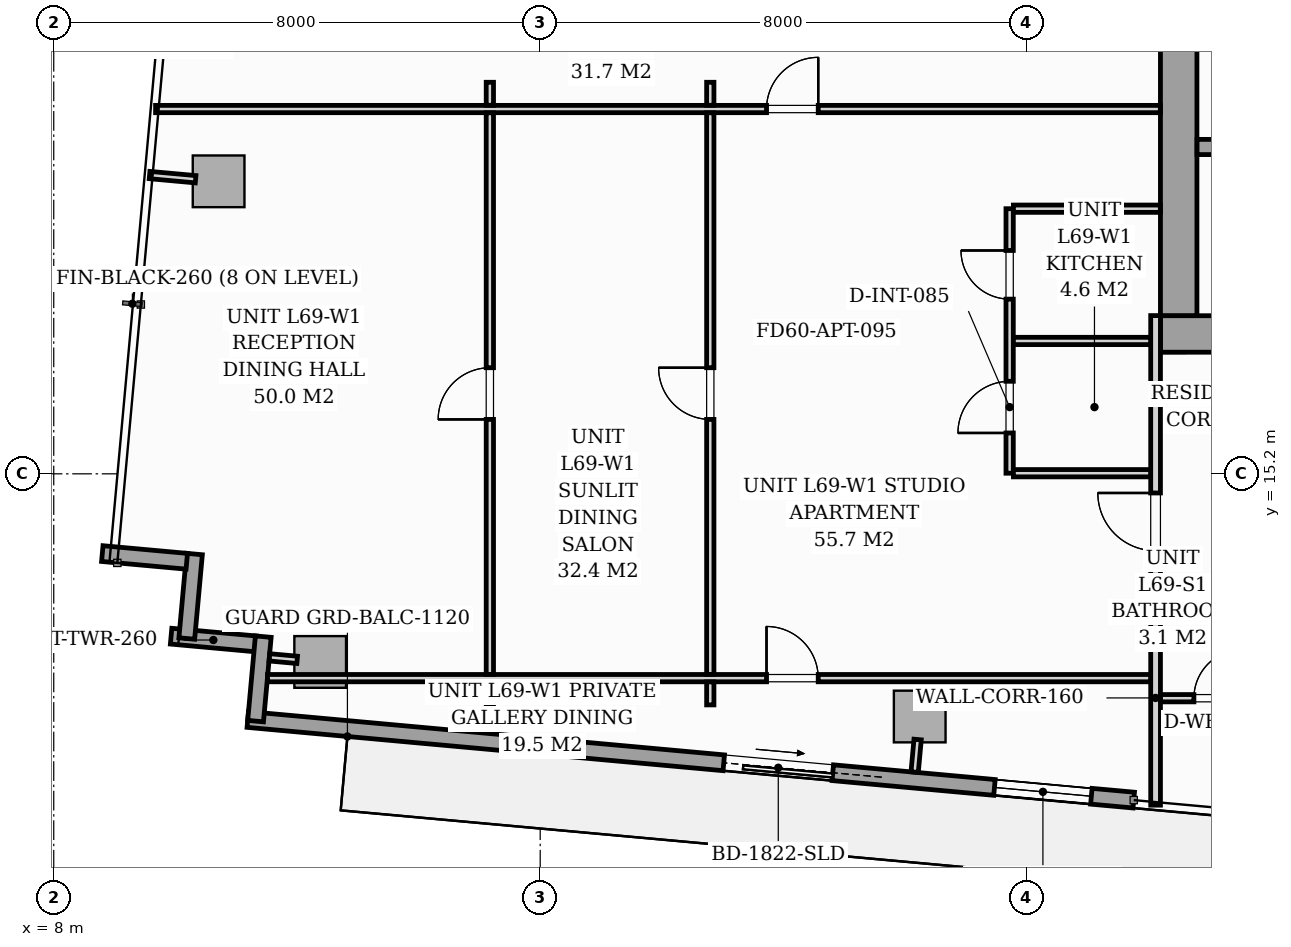
"""IFC4 building model, lengths in metres.
Left out: names, types, materials, properties, quantities, classifications, styles, units other than length and angle.
Written with IfcOpenShell. Run it as: python <this file> out.ifc"""

import sys

from ifc_helpers import new_model, si_unit, direction, frame, frame_2d, origin, origin_2d, place, context, subcontext, project, spatial, rectangle, i_section, extrude, source, transform, mapped, element, fill, save


model = new_model("IFC4")
c1 = context("Model", 3, precision=1e-05, world=origin(), true_north=direction((0.0, 1.0)))
c2 = subcontext(c1, "Body", "Model", "MODEL_VIEW")
j1 = project(units=[si_unit("LENGTHUNIT", "METRE"), si_unit("PLANEANGLEUNIT", "RADIAN")], contexts=[c1])
p1 = place(None, origin())
s1 = spatial("IfcSite", under=j1, at=p1, CompositionType="ELEMENT")
p2 = place(p1, origin())
s2 = spatial("IfcBuilding", under=s1, at=p2, CompositionType="ELEMENT")
p3 = place(p2, frame((0.0, 0.0, 239.7)))
s3 = spatial("IfcBuildingStorey", under=s2, at=p3, CompositionType="ELEMENT", Elevation=239.7)
m1 = source(origin(), c2, "Body", "SweptSolid", [
    extrude(i_section(OverallWidth=0.409, OverallDepth=0.425, WebThickness=0.033, FlangeThickness=0.052, FilletRadius=0.018, at=origin_2d()), origin(), (0.0, 0.0, 1.0), 3.296),
])
p4 = place(p3, frame((26.4, 17.4, 0.002), z_axis=(0.0, 0.0, 1.0), x_axis=(1.0, 0.0, 0.0)))
e1 = element("IfcColumn", 1, at=p4, inside=s3, PredefinedType="PILASTER", context=c2, shape_type="MappedRepresentation", body=[
    mapped(m1, transform((0.0, 0.0, 0.0), scale=1.0)),
])
m2 = source(origin(), c2, "Body", "SweptSolid", [
    extrude(rectangle(XDim=0.85, YDim=0.85, at=origin_2d()), origin(), (0.0, 0.0, 1.0), 3.296),
])
for number, where, z_axis, x_axis in (
    (2, (12.382, 12.106, 0.002), (0.0, 0.0, 1.0), (0.996, -0.091, 0.0)),
    (3, (22.241, 11.209, 0.002), (0.0, 0.0, 1.0), (0.996, -0.091, 0.0)),
    (4, (10.711, 20.01, 0.002), (0.0, 0.0, 1.0), (0.996, -0.091, 0.0)),
):
    element("IfcColumn", number, at=place(p3, frame(where, z_axis=z_axis, x_axis=x_axis)), inside=s3, PredefinedType="COLUMN", context=c2, shape_type="MappedRepresentation", body=[
        mapped(m2, transform((0.0, 0.0, 0.0), scale=1.0)),
    ])
p5 = place(p3, frame((11.319, 12.404, 0.0), z_axis=(0.0, 0.0, 1.0), x_axis=(-0.995881721538, 0.090661991521, 0.0)))
e5 = element("IfcWall", 5, at=p5, inside=s3, PredefinedType="STANDARD", context=c2, shape_type="SweptSolid", body=[
    extrude(rectangle(XDim=1.395, YDim=0.26, at=frame_2d((0.698, 0.0))), origin(), (0.0, 0.0, 1.0), 3.04),
])
p6 = place(p3, frame((10.188, 12.492, 0.0), z_axis=(0.0, 0.0, 1.0), x_axis=(0.090646191665, 0.995883159782, 0.0)))
e6 = element("IfcWall", 6, at=p6, inside=s3, PredefinedType="STANDARD", context=c2, shape_type="SweptSolid", body=[
    extrude(rectangle(XDim=1.395, YDim=0.26, at=frame_2d((0.698, 0.0))), origin(), (0.0, 0.0, 1.0), 3.04),
])
p7 = place(p3, frame((10.188, 13.762, 0.0), z_axis=(0.0, 0.0, 1.0), x_axis=(-0.995881721538, 0.090661991521, 0.0)))
e7 = element("IfcWall", 7, at=p7, inside=s3, PredefinedType="STANDARD", context=c2, shape_type="SweptSolid", body=[
    extrude(rectangle(XDim=1.395, YDim=0.26, at=frame_2d((0.698, 0.0))), origin(), (0.0, 0.0, 1.0), 3.04),
])
p8 = place(p3, frame((25.761, 9.834, 0.0), z_axis=(0.0, 0.0, 1.0), x_axis=(-0.995884584572, 0.090630536861, 0.0)))
e8 = element("IfcWall", 8, at=p8, inside=s3, PredefinedType="STANDARD", context=c2, shape_type="SweptSolid", body=[
    extrude(rectangle(XDim=14.63, YDim=0.26, at=frame_2d((7.315, 0.0))), origin(), (0.0, 0.0, 1.0), 3.04),
])
p9 = place(p8, frame((4.97, 0.0, 0.0)))
e9 = element("IfcOpeningElement", 9, at=p9, cuts=e8, PredefinedType="OPENING", context=c2, shape_type="SweptSolid", body=[
    extrude(rectangle(XDim=1.8, YDim=2.06, at=frame_2d((0.9, 1.03))), frame((0.0, 0.14, 0.0), z_axis=(0.0, -1.0, 0.0), x_axis=(1.0, 0.0, 0.0)), (0.0, 0.0, 1.0), 0.28),
])
p10 = place(p8, frame((0.7, 0.0, 0.65)))
e10 = element("IfcOpeningElement", 10, at=p10, cuts=e8, PredefinedType="OPENING", context=c2, shape_type="SweptSolid", body=[
    extrude(rectangle(XDim=1.6, YDim=1.5, at=frame_2d((0.8, 0.75))), frame((0.0, 0.14, 0.0), z_axis=(0.0, -1.0, 0.0), x_axis=(1.0, 0.0, 0.0)), (0.0, 0.0, 1.0), 0.28),
])
p11 = place(p3, frame((11.319, 11.134, 0.0), z_axis=(0.0, 0.0, 1.0), x_axis=(0.090661991521, 0.995881721538, 0.0)))
e11 = element("IfcWall", 11, at=p11, inside=s3, PredefinedType="STANDARD", context=c2, shape_type="SweptSolid", body=[
    extrude(rectangle(XDim=1.395, YDim=0.26, at=frame_2d((0.698, 0.0))), origin(), (0.0, 0.0, 1.0), 3.04),
])
p12 = place(p3, frame((26.2, 17.5, 0.0), z_axis=(0.0, 0.0, 1.0), x_axis=(1.0, 0.0, 0.0)))
e12 = element("IfcWall", 12, at=p12, inside=s3, PredefinedType="SHEAR", context=c2, shape_type="SweptSolid", body=[
    extrude(rectangle(XDim=19.6, YDim=0.6, at=frame_2d((9.8, 0.0))), origin(), (0.0, 0.0, 1.0), 3.3),
])
p13 = place(p12, frame((0.95, 0.0, 0.0)))
e13 = element("IfcOpeningElement", 13, at=p13, cuts=e12, PredefinedType="OPENING", context=c2, shape_type="SweptSolid", body=[
    extrude(rectangle(XDim=0.95, YDim=2.06, at=frame_2d((0.475, 1.03))), frame((0.0, 0.31, 0.0), z_axis=(0.0, -1.0, 0.0), x_axis=(1.0, 0.0, 0.0)), (0.0, 0.0, 1.0), 0.62),
])
p14 = place(p12, frame((9.38, 0.0, 0.0)))
e14 = element("IfcOpeningElement", 14, at=p14, cuts=e12, PredefinedType="OPENING", context=c2, shape_type="SweptSolid", body=[
    extrude(rectangle(XDim=0.85, YDim=2.0, at=frame_2d((0.425, 1.0))), frame((0.0, 0.31, 0.0), z_axis=(0.0, -1.0, 0.0), x_axis=(1.0, 0.0, 0.0)), (0.0, 0.0, 1.0), 0.62),
])
p15 = place(p12, frame((17.55, 0.0, 0.0)))
e15 = element("IfcOpeningElement", 15, at=p15, cuts=e12, PredefinedType="OPENING", context=c2, shape_type="SweptSolid", body=[
    extrude(rectangle(XDim=0.95, YDim=2.06, at=frame_2d((0.475, 1.03))), frame((0.0, 0.31, 0.0), z_axis=(0.0, -1.0, 0.0), x_axis=(1.0, 0.0, 0.0)), (0.0, 0.0, 1.0), 0.62),
])
p16 = place(p3, frame((26.5, 17.802, 0.0), z_axis=(0.0, 0.0, 1.0), x_axis=(0.0, 1.0, 0.0)))
e16 = element("IfcWall", 16, at=p16, inside=s3, PredefinedType="SHEAR", context=c2, shape_type="SweptSolid", body=[
    extrude(rectangle(XDim=5.796, YDim=0.6, at=frame_2d((2.898, 0.0))), origin(), (0.0, 0.0, 1.0), 3.3),
])
p17 = place(p3, frame((26.802, 20.575, 0.0), z_axis=(0.0, 0.0, 1.0), x_axis=(1.0, 0.0, 0.0)))
e17 = element("IfcWall", 17, at=p17, inside=s3, PredefinedType="SOLIDWALL", context=c2, shape_type="SweptSolid", body=[
    extrude(rectangle(XDim=8.148, YDim=0.25, at=frame_2d((4.074, 0.0))), origin(), (0.0, 0.0, 1.0), 3.3),
])
p18 = place(p17, frame((0.298, 0.0, 0.0)))
e18 = element("IfcOpeningElement", 18, at=p18, cuts=e17, PredefinedType="OPENING", context=c2, shape_type="SweptSolid", body=[
    extrude(rectangle(XDim=0.95, YDim=2.06, at=frame_2d((0.475, 1.03))), frame((0.0, 0.135, 0.0), z_axis=(0.0, -1.0, 0.0), x_axis=(1.0, 0.0, 0.0)), (0.0, 0.0, 1.0), 0.27),
])
p19 = place(p3, frame((26.12, 13.36, 0.0), z_axis=(0.0, 0.0, 1.0), x_axis=(1.0, 0.0, 0.0)))
e19 = element("IfcWall", 19, at=p19, inside=s3, PredefinedType="PARTITIONING", context=c2, shape_type="SweptSolid", body=[
    extrude(rectangle(XDim=19.76, YDim=0.16, at=frame_2d((9.88, 0.0))), origin(), (0.0, 0.0, 1.0), 2.605),
])
p20 = place(p19, frame((5.221, 0.0, 0.0)))
e20 = element("IfcOpeningElement", 20, at=p20, cuts=e19, PredefinedType="OPENING", context=c2, shape_type="SweptSolid", body=[
    extrude(rectangle(XDim=0.95, YDim=2.06, at=frame_2d((0.475, 1.03))), frame((0.0, 0.09, 0.0), z_axis=(0.0, -1.0, 0.0), x_axis=(1.0, 0.0, 0.0)), (0.0, 0.0, 1.0), 0.18),
])
p21 = place(p19, frame((8.074, 0.0, 0.0)))
e21 = element("IfcOpeningElement", 21, at=p21, cuts=e19, PredefinedType="OPENING", context=c2, shape_type="SweptSolid", body=[
    extrude(rectangle(XDim=0.95, YDim=2.06, at=frame_2d((0.475, 1.03))), frame((0.0, 0.09, 0.0), z_axis=(0.0, -1.0, 0.0), x_axis=(1.0, 0.0, 0.0)), (0.0, 0.0, 1.0), 0.18),
])
p22 = place(p19, frame((18.17, 0.0, 0.0)))
e22 = element("IfcOpeningElement", 22, at=p22, cuts=e19, PredefinedType="OPENING", context=c2, shape_type="SweptSolid", body=[
    extrude(rectangle(XDim=0.95, YDim=2.06, at=frame_2d((0.475, 1.03))), frame((0.0, 0.09, 0.0), z_axis=(0.0, -1.0, 0.0), x_axis=(1.0, 0.0, 0.0)), (0.0, 0.0, 1.0), 0.18),
])
p23 = place(p3, frame((26.12, 9.751, 0.0), z_axis=(0.0, 0.0, 1.0), x_axis=(0.0, 1.0, 0.0)))
e23 = element("IfcWall", 23, at=p23, inside=s3, PredefinedType="PARTITIONING", context=c2, shape_type="SweptSolid", body=[
    extrude(rectangle(XDim=3.527, YDim=0.16, at=frame_2d((1.763, 0.0))), origin(), (0.0, 0.0, 1.0), 3.04),
])
p24 = place(p3, frame((26.12, 13.442, 0.0), z_axis=(0.0, 0.0, 1.0), x_axis=(0.0, 1.0, 0.0)))
e24 = element("IfcWall", 24, at=p24, inside=s3, PredefinedType="PARTITIONING", context=c2, shape_type="SweptSolid", body=[
    extrude(rectangle(XDim=4.36, YDim=0.16, at=frame_2d((2.18, 0.0))), origin(), (0.0, 0.0, 1.0), 3.04),
])
p25 = place(p24, frame((0.493, 0.0, 0.0)))
e25 = element("IfcOpeningElement", 25, at=p25, cuts=e24, PredefinedType="OPENING", context=c2, shape_type="SweptSolid", body=[
    extrude(rectangle(XDim=0.95, YDim=2.06, at=frame_2d((0.475, 1.03))), frame((0.0, 0.09, 0.0), z_axis=(0.0, -1.0, 0.0), x_axis=(1.0, 0.0, 0.0)), (0.0, 0.0, 1.0), 0.18),
])
p26 = place(p3, frame((26.202, 11.51, 0.0), z_axis=(0.0, 0.0, 1.0), x_axis=(1.0, 0.0, 0.0)))
e26 = element("IfcWall", 26, at=p26, inside=s3, PredefinedType="PARTITIONING", context=c2, shape_type="SweptSolid", body=[
    extrude(rectangle(XDim=4.098, YDim=0.12, at=frame_2d((2.049, 0.0))), origin(), (0.0, 0.0, 1.0), 2.605),
])
p27 = place(p26, frame((0.548, 0.0, 0.0)))
e27 = element("IfcOpeningElement", 27, at=p27, cuts=e26, PredefinedType="OPENING", context=c2, shape_type="SweptSolid", body=[
    extrude(rectangle(XDim=0.8, YDim=2.02, at=frame_2d((0.4, 1.01))), frame((0.0, 0.07, 0.0), z_axis=(0.0, -1.0, 0.0), x_axis=(1.0, 0.0, 0.0)), (0.0, 0.0, 1.0), 0.14),
])
p28 = place(p26, frame((2.573, 0.0, 0.0)))
e28 = element("IfcOpeningElement", 28, at=p28, cuts=e26, PredefinedType="OPENING", context=c2, shape_type="SweptSolid", body=[
    extrude(rectangle(XDim=0.85, YDim=2.05, at=frame_2d((0.425, 1.025))), frame((0.0, 0.07, 0.0), z_axis=(0.0, -1.0, 0.0), x_axis=(1.0, 0.0, 0.0)), (0.0, 0.0, 1.0), 0.14),
])
p29 = place(p3, frame((23.72, 15.21, 0.0), z_axis=(0.0, 0.0, 1.0), x_axis=(0.0, 1.0, 0.0)))
e29 = element("IfcWall", 29, at=p29, inside=s3, PredefinedType="PARTITIONING", context=c2, shape_type="SweptSolid", body=[
    extrude(rectangle(XDim=4.35, YDim=0.12, at=frame_2d((2.175, 0.0))), origin(), (0.0, 0.0, 1.0), 3.04),
])
p30 = place(p29, frame((0.662, 0.0, 0.0)))
e30 = element("IfcOpeningElement", 30, at=p30, cuts=e29, PredefinedType="OPENING", context=c2, shape_type="SweptSolid", body=[
    extrude(rectangle(XDim=0.85, YDim=2.05, at=frame_2d((0.425, 1.025))), frame((0.0, 0.07, 0.0), z_axis=(0.0, -1.0, 0.0), x_axis=(1.0, 0.0, 0.0)), (0.0, 0.0, 1.0), 0.14),
])
p31 = place(p29, frame((2.863, 0.0, 0.0)))
e31 = element("IfcOpeningElement", 31, at=p31, cuts=e29, PredefinedType="OPENING", context=c2, shape_type="SweptSolid", body=[
    extrude(rectangle(XDim=0.8, YDim=2.02, at=frame_2d((0.4, 1.01))), frame((0.0, 0.07, 0.0), z_axis=(0.0, -1.0, 0.0), x_axis=(1.0, 0.0, 0.0)), (0.0, 0.0, 1.0), 0.14),
])
p32 = place(p3, frame((23.782, 17.385, 0.0), z_axis=(0.0, 0.0, 1.0), x_axis=(1.0, 0.0, 0.0)))
e32 = element("IfcWall", 32, at=p32, inside=s3, PredefinedType="PARTITIONING", context=c2, shape_type="SweptSolid", body=[
    extrude(rectangle(XDim=2.256, YDim=0.12, at=frame_2d((1.128, 0.0))), origin(), (0.0, 0.0, 1.0), 2.381),
])
p33 = place(p3, frame((23.782, 15.21, 0.0), z_axis=(0.0, 0.0, 1.0), x_axis=(1.0, 0.0, 0.0)))
e33 = element("IfcWall", 33, at=p33, inside=s3, PredefinedType="PARTITIONING", context=c2, shape_type="SweptSolid", body=[
    extrude(rectangle(XDim=2.256, YDim=0.12, at=frame_2d((1.128, 0.0))), origin(), (0.0, 0.0, 1.0), 3.04),
])
p34 = place(p3, frame((23.782, 19.56, 0.0), z_axis=(0.0, 0.0, 1.0), x_axis=(1.0, 0.0, 0.0)))
e34 = element("IfcWall", 34, at=p34, inside=s3, PredefinedType="PARTITIONING", context=c2, shape_type="SweptSolid", body=[
    extrude(rectangle(XDim=2.416, YDim=0.12, at=frame_2d((1.208, 0.0))), origin(), (0.0, 0.0, 1.0), 3.04),
])
p35 = place(p3, frame((11.516, 11.84, 0.0), z_axis=(0.0, 0.0, 1.0), x_axis=(1.0, 0.0, 0.0)))
e35 = element("IfcWall", 35, at=p35, inside=s3, PredefinedType="PARTITIONING", context=c2, shape_type="SweptSolid", body=[
    extrude(rectangle(XDim=14.522, YDim=0.12, at=frame_2d((7.261, 0.0))), origin(), (0.0, 0.0, 1.0), 2.483),
])
p36 = place(p35, frame((8.206, 0.0, 0.0)))
e36 = element("IfcOpeningElement", 36, at=p36, cuts=e35, PredefinedType="OPENING", context=c2, shape_type="SweptSolid", body=[
    extrude(rectangle(XDim=0.85, YDim=2.05, at=frame_2d((0.425, 1.025))), frame((0.0, 0.07, 0.0), z_axis=(0.0, -1.0, 0.0), x_axis=(1.0, 0.0, 0.0)), (0.0, 0.0, 1.0), 0.14),
])
p37 = place(p3, frame((9.675, 21.199, 0.0), z_axis=(0.0, 0.0, 1.0), x_axis=(1.0, 0.0, 0.0)))
e37 = element("IfcWall", 37, at=p37, inside=s3, PredefinedType="PARTITIONING", context=c2, shape_type="SweptSolid", body=[
    extrude(rectangle(XDim=16.523, YDim=0.12, at=frame_2d((8.262, 0.0))), origin(), (0.0, 0.0, 1.0), 3.04),
])
p38 = place(p37, frame((10.047, 0.0, 0.0)))
e38 = element("IfcOpeningElement", 38, at=p38, cuts=e37, PredefinedType="OPENING", context=c2, shape_type="SweptSolid", body=[
    extrude(rectangle(XDim=0.85, YDim=2.05, at=frame_2d((0.425, 1.025))), frame((0.0, 0.07, 0.0), z_axis=(0.0, -1.0, 0.0), x_axis=(1.0, 0.0, 0.0)), (0.0, 0.0, 1.0), 0.14),
])
p39 = place(p3, frame((15.172, 11.4, 0.0), z_axis=(0.0, 0.0, 1.0), x_axis=(0.0, 1.0, 0.0)))
e39 = element("IfcWall", 39, at=p39, inside=s3, PredefinedType="PARTITIONING", context=c2, shape_type="SweptSolid", body=[
    extrude(rectangle(XDim=0.378, YDim=0.12, at=frame_2d((0.189, 0.0))), origin(), (0.0, 0.0, 1.0), 3.04),
])
p40 = place(p3, frame((15.172, 11.902, 0.0), z_axis=(0.0, 0.0, 1.0), x_axis=(0.0, 1.0, 0.0)))
e40 = element("IfcWall", 40, at=p40, inside=s3, PredefinedType="PARTITIONING", context=c2, shape_type="SweptSolid", body=[
    extrude(rectangle(XDim=9.235, YDim=0.12, at=frame_2d((4.617, 0.0))), origin(), (0.0, 0.0, 1.0), 3.04),
])
p41 = place(p40, frame((4.193, 0.0, 0.0)))
e41 = element("IfcOpeningElement", 41, at=p41, cuts=e40, PredefinedType="OPENING", context=c2, shape_type="SweptSolid", body=[
    extrude(rectangle(XDim=0.85, YDim=2.05, at=frame_2d((0.425, 1.025))), frame((0.0, 0.07, 0.0), z_axis=(0.0, -1.0, 0.0), x_axis=(1.0, 0.0, 0.0)), (0.0, 0.0, 1.0), 0.14),
])
p42 = place(p3, frame((15.172, 21.261, 0.0), z_axis=(0.0, 0.0, 1.0), x_axis=(0.0, 1.0, 0.0)))
e42 = element("IfcWall", 42, at=p42, inside=s3, PredefinedType="PARTITIONING", context=c2, shape_type="SweptSolid", body=[
    extrude(rectangle(XDim=0.378, YDim=0.12, at=frame_2d((0.189, 0.0))), origin(), (0.0, 0.0, 1.0), 3.04),
])
p43 = place(p3, frame((18.797, 11.4, 0.0), z_axis=(0.0, 0.0, 1.0), x_axis=(0.0, 1.0, 0.0)))
e43 = element("IfcWall", 43, at=p43, inside=s3, PredefinedType="PARTITIONING", context=c2, shape_type="SweptSolid", body=[
    extrude(rectangle(XDim=0.378, YDim=0.12, at=frame_2d((0.189, 0.0))), origin(), (0.0, 0.0, 1.0), 3.04),
])
p44 = place(p3, frame((18.797, 11.902, 0.0), z_axis=(0.0, 0.0, 1.0), x_axis=(0.0, 1.0, 0.0)))
e44 = element("IfcWall", 44, at=p44, inside=s3, PredefinedType="PARTITIONING", context=c2, shape_type="SweptSolid", body=[
    extrude(rectangle(XDim=9.235, YDim=0.12, at=frame_2d((4.617, 0.0))), origin(), (0.0, 0.0, 1.0), 3.04),
])
p45 = place(p44, frame((4.193, 0.0, 0.0)))
e45 = element("IfcOpeningElement", 45, at=p45, cuts=e44, PredefinedType="OPENING", context=c2, shape_type="SweptSolid", body=[
    extrude(rectangle(XDim=0.85, YDim=2.05, at=frame_2d((0.425, 1.025))), frame((0.0, 0.07, 0.0), z_axis=(0.0, -1.0, 0.0), x_axis=(1.0, 0.0, 0.0)), (0.0, 0.0, 1.0), 0.14),
])
p46 = place(p3, frame((18.797, 21.261, 0.0), z_axis=(0.0, 0.0, 1.0), x_axis=(0.0, 1.0, 0.0)))
e46 = element("IfcWall", 46, at=p46, inside=s3, PredefinedType="PARTITIONING", context=c2, shape_type="SweptSolid", body=[
    extrude(rectangle(XDim=0.378, YDim=0.12, at=frame_2d((0.189, 0.0))), origin(), (0.0, 0.0, 1.0), 3.04),
])
p47 = place(p3, frame((12.003, 12.141, 0.0), z_axis=(0.0, 0.0, 1.0), x_axis=(-0.995884462012, 0.090631883588, 0.0)))
e47 = element("IfcWall", 47, at=p47, inside=s3, PredefinedType="PARTITIONING", context=c2, shape_type="SweptSolid", body=[
    extrude(rectangle(XDim=0.458, YDim=0.12, at=frame_2d((0.229, 0.0))), origin(), (0.0, 0.0, 1.0), 3.04),
])
p48 = place(p3, frame((22.207, 10.831, 0.0), z_axis=(0.0, 0.0, 1.0), x_axis=(-0.090781299264, -0.995870852924, 0.0)))
e48 = element("IfcWall", 48, at=p48, inside=s3, PredefinedType="PARTITIONING", context=c2, shape_type="SweptSolid", body=[
    extrude(rectangle(XDim=0.538, YDim=0.12, at=frame_2d((0.269, 0.0))), origin(), (0.0, 0.0, 1.0), 3.04),
])
p49 = place(p3, frame((10.333, 20.045, 0.0), z_axis=(0.0, 0.0, 1.0), x_axis=(-0.995890573658, 0.09056470228, 0.0)))
e49 = element("IfcWall", 49, at=p49, inside=s3, PredefinedType="PARTITIONING", context=c2, shape_type="SweptSolid", body=[
    extrude(rectangle(XDim=0.76, YDim=0.12, at=frame_2d((0.38, 0.0))), origin(), (0.0, 0.0, 1.0), 3.04),
])
m3 = source(origin(), c2, "Body", "SweptSolid", [
    extrude(rectangle(XDim=1.8, YDim=2.06, at=frame_2d((0.9, 1.03))), frame((0.0, 0.025, 0.0), z_axis=(0.0, -1.0, 0.0), x_axis=(1.0, 0.0, 0.0)), (0.0, 0.0, 1.0), 0.05),
])
p50 = place(p9, origin())
e50 = element("IfcDoor", 50, at=p50, inside=s3, OperationType="SLIDING_TO_LEFT", PredefinedType="DOOR", context=c2, shape_type="MappedRepresentation", body=[
    mapped(m3, transform((0.0, 0.0, 0.0), scale=1.0)),
])
fill(e9, e50)
m4 = source(origin(), c2, "Body", "SweptSolid", [
    extrude(rectangle(XDim=1.6, YDim=1.5, at=frame_2d((0.8, 0.75))), frame((0.0, 0.03, 0.0), z_axis=(0.0, -1.0, 0.0), x_axis=(1.0, 0.0, 0.0)), (0.0, 0.0, 1.0), 0.06),
])
p51 = place(p10, origin())
e51 = element("IfcWindow", 51, at=p51, inside=s3, PartitioningType="SINGLE_PANEL", PredefinedType="WINDOW", context=c2, shape_type="MappedRepresentation", body=[
    mapped(m4, transform((0.0, 0.0, 0.0), scale=1.0)),
])
fill(e10, e51)
m5 = source(origin(), c2, "Body", "SweptSolid", [
    extrude(rectangle(XDim=0.8, YDim=2.02, at=frame_2d((0.4, 1.01))), frame((0.0, 0.025, 0.0), z_axis=(0.0, -1.0, 0.0), x_axis=(1.0, 0.0, 0.0)), (0.0, 0.0, 1.0), 0.05),
])
p52 = place(p27, origin())
e52 = element("IfcDoor", 52, at=p52, inside=s3, OperationType="SINGLE_SWING_RIGHT", PredefinedType="DOOR", context=c2, shape_type="MappedRepresentation", body=[
    mapped(m5, transform((0.0, 0.0, 0.0), scale=1.0)),
])
fill(e27, e52)
m6 = source(origin(), c2, "Body", "SweptSolid", [
    extrude(rectangle(XDim=0.95, YDim=2.06, at=frame_2d((0.475, 1.03))), frame((0.0, 0.025, 0.0), z_axis=(0.0, -1.0, 0.0), x_axis=(1.0, 0.0, 0.0)), (0.0, 0.0, 1.0), 0.05),
])
p53 = place(p25, origin())
e53 = element("IfcDoor", 53, at=p53, inside=s3, OperationType="SINGLE_SWING_RIGHT", PredefinedType="DOOR", context=c2, shape_type="MappedRepresentation", body=[
    mapped(m6, transform((0.0, 0.0, 0.0), scale=1.0)),
])
fill(e25, e53)
m7 = source(origin(), c2, "Body", "SweptSolid", [
    extrude(rectangle(XDim=0.85, YDim=2.05, at=frame_2d((0.425, 1.025))), frame((0.0, 0.025, 0.0), z_axis=(0.0, -1.0, 0.0), x_axis=(1.0, 0.0, 0.0)), (0.0, 0.0, 1.0), 0.05),
])
p54 = place(p30, origin())
e54 = element("IfcDoor", 54, at=p54, inside=s3, OperationType="SINGLE_SWING_LEFT", PredefinedType="DOOR", context=c2, shape_type="MappedRepresentation", body=[
    mapped(m7, transform((0.0, 0.0, 0.0), scale=1.0)),
])
fill(e30, e54)
p55 = place(p31, origin())
e55 = element("IfcDoor", 55, at=p55, inside=s3, OperationType="SINGLE_SWING_RIGHT", PredefinedType="DOOR", context=c2, shape_type="MappedRepresentation", body=[
    mapped(m5, transform((0.0, 0.0, 0.0), scale=1.0)),
])
fill(e31, e55)
p56 = place(p36, origin())
e56 = element("IfcDoor", 56, at=p56, inside=s3, OperationType="SINGLE_SWING_LEFT", PredefinedType="DOOR", context=c2, shape_type="MappedRepresentation", body=[
    mapped(m7, transform((0.0, 0.0, 0.0), scale=1.0)),
])
fill(e36, e56)
p57 = place(p38, origin())
e57 = element("IfcDoor", 57, at=p57, inside=s3, OperationType="SINGLE_SWING_RIGHT", PredefinedType="DOOR", context=c2, shape_type="MappedRepresentation", body=[
    mapped(m7, transform((0.0, 0.0, 0.0), scale=1.0)),
])
fill(e38, e57)
p58 = place(p41, origin())
e58 = element("IfcDoor", 58, at=p58, inside=s3, OperationType="SINGLE_SWING_LEFT", PredefinedType="DOOR", context=c2, shape_type="MappedRepresentation", body=[
    mapped(m7, transform((0.0, 0.0, 0.0), scale=1.0)),
])
fill(e41, e58)
p59 = place(p45, origin())
e59 = element("IfcDoor", 59, at=p59, inside=s3, OperationType="SINGLE_SWING_RIGHT", PredefinedType="DOOR", context=c2, shape_type="MappedRepresentation", body=[
    mapped(m7, transform((0.0, 0.0, 0.0), scale=1.0)),
])
fill(e45, e59)
save(model, sys.argv[1])
